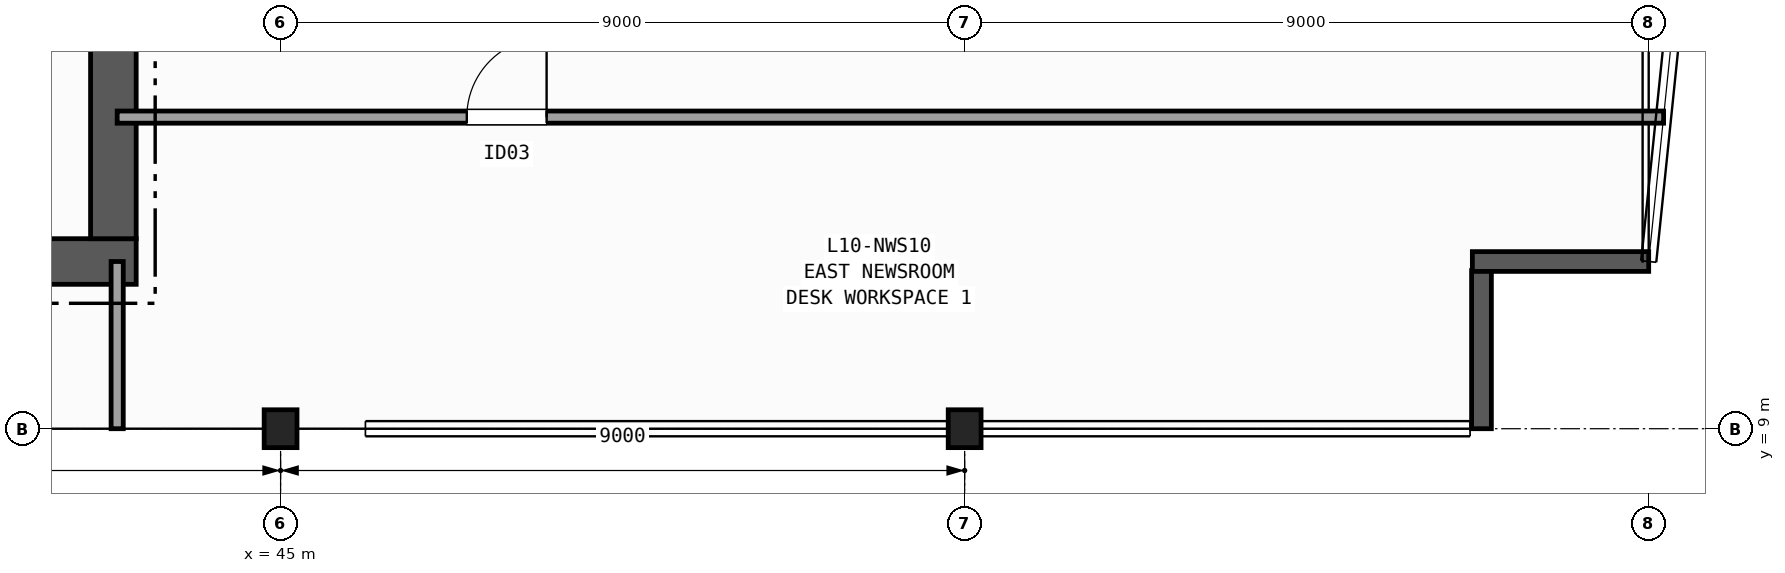
"""IFC4 building model, lengths in metres.
Left out: names, types, materials, properties, quantities, classifications, styles, units other than length and angle.
Written with IfcOpenShell. Run it as: python <this file> out.ifc"""

import sys

from ifc_helpers import new_model, si_unit, direction, frame, frame_2d, origin, origin_2d, place, context, subcontext, project, spatial, rectangle, i_section, extrude, element, fill, save


model = new_model("IFC4")
c1 = context("Model", 3, precision=1e-05, world=origin(), true_north=direction((0.0, 1.0)))
c2 = subcontext(c1, "Body", "Model", "MODEL_VIEW")
j1 = project(units=[si_unit("LENGTHUNIT", "METRE"), si_unit("PLANEANGLEUNIT", "RADIAN")], contexts=[c1])
p1 = place(None, origin())
s1 = spatial("IfcSite", under=j1, at=p1, CompositionType="ELEMENT")
p2 = place(p1, origin())
s2 = spatial("IfcBuilding", under=s1, at=p2, CompositionType="ELEMENT")
p3 = place(p2, frame((0.0, 0.0, 47.1)))
s3 = spatial("IfcBuildingStorey", under=s2, at=p3, CompositionType="ELEMENT", Elevation=47.1)
for number, where, z_axis, x_axis in (
    (1, (45.0, 9.0, 0.0), (0.0, 0.0, 1.0), (1.0, 0.0, 0.0)),
    (2, (54.0, 9.0, 0.0), (0.0, 0.0, 1.0), (1.0, 0.0, 0.0)),
):
    element("IfcColumn", number, at=place(p3, frame(where, z_axis=z_axis, x_axis=x_axis)), inside=s3, PredefinedType="COLUMN", context=c2, shape_type="SweptSolid", body=[
        extrude(i_section(OverallWidth=0.432, OverallDepth=0.498, WebThickness=0.056, FlangeThickness=0.089, FilletRadius=0.015, at=origin_2d()), origin(), (0.0, 0.0, 1.0), 3.7),
    ])
p4 = place(p3, frame((60.8, 9.0, 0.0), z_axis=(0.0, 0.0, 1.0), x_axis=(0.0, 1.0, 0.0)))
e3 = element("IfcWall", 3, at=p4, inside=s3, PredefinedType="SOLIDWALL", context=c2, shape_type="SweptSolid", body=[
    extrude(rectangle(XDim=2.08, YDim=0.26, at=frame_2d((1.04, 0.0))), origin(), (0.0, 0.0, 1.0), 3.42),
])
p5 = place(p3, frame((60.68, 11.2, 0.0), z_axis=(0.0, 0.0, 1.0), x_axis=(1.0, 0.0, 0.0)))
e4 = element("IfcWall", 4, at=p5, inside=s3, PredefinedType="SOLIDWALL", context=c2, shape_type="SweptSolid", body=[
    extrude(rectangle(XDim=2.32, YDim=0.26, at=frame_2d((1.16, 0.0))), origin(), (0.0, 0.0, 1.0), 3.42),
])
p6 = place(p3, frame((29.1, 11.2, 0.0), z_axis=(0.0, 0.0, 1.0), x_axis=(1.0, 0.0, 0.0)))
e5 = element("IfcWall", 5, at=p6, inside=s3, PredefinedType="SHEAR", context=c2, shape_type="SweptSolid", body=[
    extrude(rectangle(XDim=14.0, YDim=0.6, at=frame_2d((7.0, 0.0))), origin(), (0.0, 0.0, 1.0), 3.42),
])
p7 = place(p3, frame((42.8, 11.5, 0.0), z_axis=(0.0, 0.0, 1.0), x_axis=(0.0, 1.0, 0.0)))
e6 = element("IfcWall", 6, at=p7, inside=s3, PredefinedType="SHEAR", context=c2, shape_type="SweptSolid", body=[
    extrude(rectangle(XDim=12.8, YDim=0.6, at=frame_2d((6.4, 0.0))), origin(), (0.0, 0.0, 1.0), 3.42),
])
p8 = place(p3, frame((42.85, 9.0, 0.0), z_axis=(0.0, 0.0, 1.0), x_axis=(0.0, 1.0, 0.0)))
e7 = element("IfcWall", 7, at=p8, inside=s3, PredefinedType="PARTITIONING", context=c2, shape_type="SweptSolid", body=[
    extrude(rectangle(XDim=2.2, YDim=0.16, at=frame_2d((1.1, 0.0))), origin(), (0.0, 0.0, 1.0), 2.627),
])
p9 = place(p3, frame((42.85, 13.1, 0.0), z_axis=(0.0, 0.0, 1.0), x_axis=(1.0, 0.0, 0.0)))
e8 = element("IfcWall", 8, at=p9, inside=s3, PredefinedType="PARTITIONING", context=c2, shape_type="SweptSolid", body=[
    extrude(rectangle(XDim=20.346, YDim=0.16, at=frame_2d((10.173, 0.0))), origin(), (0.0, 0.0, 1.0), 3.42),
])
p10 = place(p9, frame((4.6, 0.0, 0.0)))
e9 = element("IfcOpeningElement", 9, at=p10, cuts=e8, PredefinedType="OPENING", context=c2, shape_type="SweptSolid", body=[
    extrude(rectangle(XDim=1.05, YDim=2.15, at=frame_2d((0.525, 1.075))), frame((0.0, 0.09, 0.0), z_axis=(0.0, -1.0, 0.0), x_axis=(1.0, 0.0, 0.0)), (0.0, 0.0, 1.0), 0.18),
])
p11 = place(p10, origin())
e10 = element("IfcDoor", 10, at=p11, inside=s3, OperationType="SINGLE_SWING_RIGHT", PredefinedType="DOOR", context=c2, shape_type="SweptSolid", body=[
    extrude(rectangle(XDim=1.05, YDim=2.15, at=frame_2d((0.525, 1.075))), frame((0.0, 0.025, 0.0), z_axis=(0.0, -1.0, 0.0), x_axis=(1.0, 0.0, 0.0)), (0.0, 0.0, 1.0), 0.05),
])
fill(e9, e10)
save(model, sys.argv[1])
